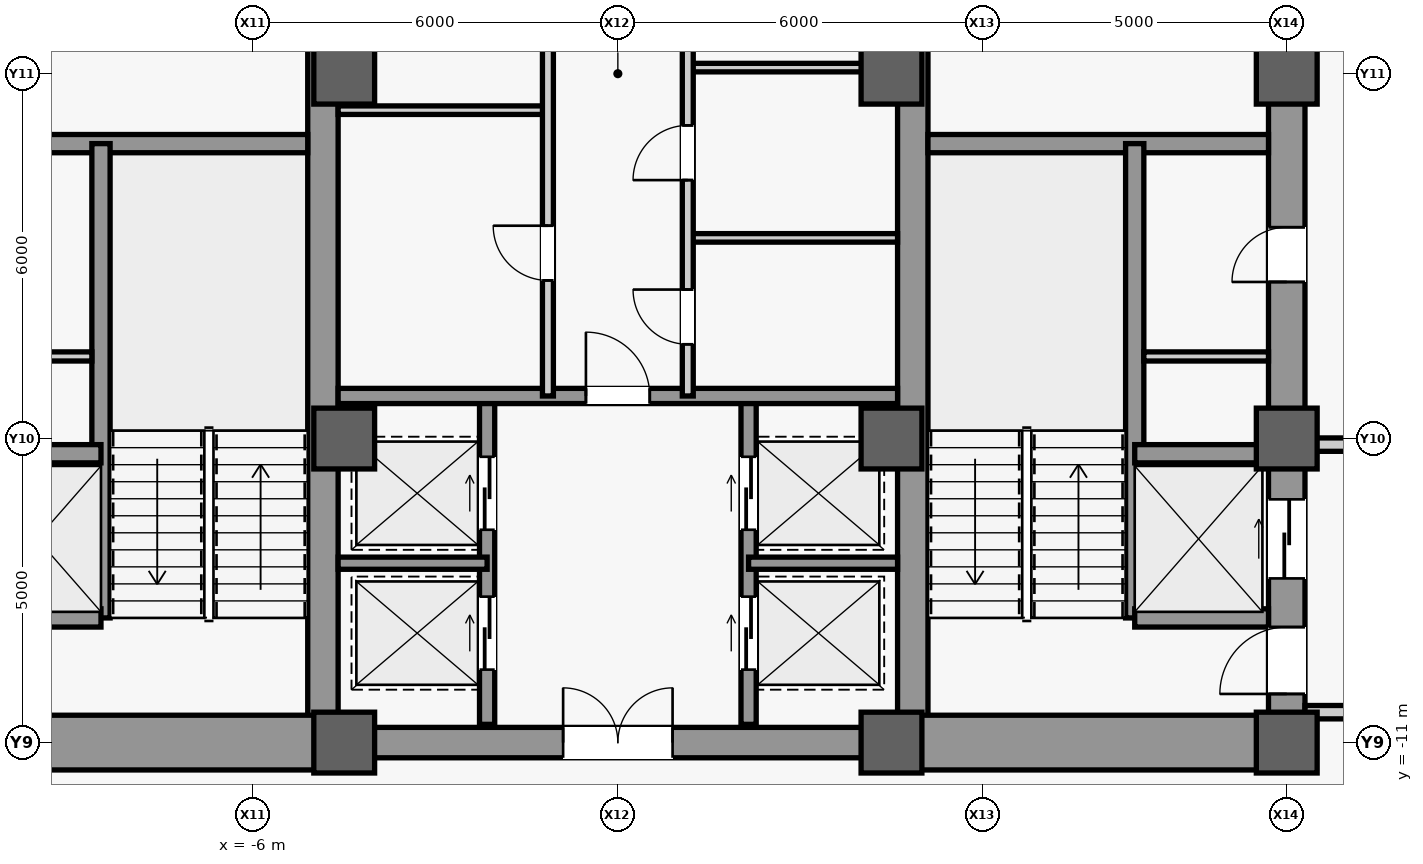
"""IFC4 building model, lengths in metres.
Left out: names, types, materials, properties, quantities, classifications, styles, units other than length and angle.
Written with IfcOpenShell. Run it as: python <this file> out.ifc"""

import sys

from ifc_helpers import new_model, si_unit, direction, frame, frame_2d, origin, origin_2d, place, context, subcontext, project, spatial, rectangle, extrude, source, transform, mapped, element, fill, save


model = new_model("IFC4")
c1 = context("Model", 3, precision=1e-05, world=origin(), true_north=direction((0.0, 1.0)))
c2 = subcontext(c1, "Body", "Model", "MODEL_VIEW")
j1 = project(units=[si_unit("LENGTHUNIT", "METRE"), si_unit("PLANEANGLEUNIT", "RADIAN")], contexts=[c1])
p1 = place(None, origin())
s1 = spatial("IfcSite", under=j1, at=p1, CompositionType="ELEMENT")
p2 = place(p1, origin())
s2 = spatial("IfcBuilding", under=s1, at=p2, CompositionType="ELEMENT")
p3 = place(p2, frame((0.0, 0.0, 70.4)))
s3 = spatial("IfcBuildingStorey", under=s2, at=p3, CompositionType="ELEMENT", Elevation=70.4)
m1 = source(origin(), c2, "Body", "SweptSolid", [
    extrude(rectangle(XDim=22.0, YDim=0.6, at=frame_2d((11.0, 0.0))), origin(), (0.0, 0.0, 1.0), 3.94),
])
p4 = place(p3, frame((11.0, -11.0, 0.0), z_axis=(0.0, 0.0, 1.0), x_axis=(0.0, 1.0, 0.0)))
e1 = element("IfcWall", 1, at=p4, inside=s3, PredefinedType="SHEAR", context=c2, shape_type="MappedRepresentation", body=[
    mapped(m1, transform((0.0, 0.0, 0.0), scale=1.0)),
])
m2 = source(origin(), c2, "Body", "SweptSolid", [
    extrude(rectangle(XDim=1.1, YDim=2.2, at=frame_2d((0.55, 1.1))), frame((0.0, 0.31, 0.0), z_axis=(0.0, -1.0, 0.0), x_axis=(1.0, 0.0, 0.0)), (0.0, 0.0, 1.0), 0.62),
])
p5 = place(p4, frame((0.8, 0.0, 0.0)))
e2 = element("IfcOpeningElement", 2, at=p5, cuts=e1, PredefinedType="OPENING", context=c2, shape_type="MappedRepresentation", body=[
    mapped(m2, transform((0.0, 0.0, 0.0), scale=1.0)),
])
m3 = source(origin(), c2, "Body", "SweptSolid", [
    extrude(rectangle(XDim=0.9, YDim=2.15, at=frame_2d((0.45, 1.075))), frame((0.0, 0.31, 0.0), z_axis=(0.0, -1.0, 0.0), x_axis=(1.0, 0.0, 0.0)), (0.0, 0.0, 1.0), 0.62),
])
p6 = place(p4, frame((7.575, 0.0, 0.0)))
e3 = element("IfcOpeningElement", 3, at=p6, cuts=e1, PredefinedType="OPENING", context=c2, shape_type="MappedRepresentation", body=[
    mapped(m3, transform((0.0, 0.0, 0.0), scale=1.0)),
])
m4 = source(origin(), c2, "Body", "SweptSolid", [
    extrude(rectangle(XDim=1.3, YDim=2.3, at=frame_2d((0.65, 1.15))), frame((0.0, 0.31, 0.0), z_axis=(0.0, -1.0, 0.0), x_axis=(1.0, 0.0, 0.0)), (0.0, 0.0, 1.0), 0.62),
])
p7 = place(p4, frame((2.7, 0.0, 0.0)))
e4 = element("IfcOpeningElement", 4, at=p7, cuts=e1, PredefinedType="OPENING", context=c2, shape_type="MappedRepresentation", body=[
    mapped(m4, transform((0.0, 0.0, 0.0), scale=1.0)),
])
p8 = place(p4, frame((13.35, 0.0, 0.0)))
e5 = element("IfcOpeningElement", 5, at=p8, cuts=e1, PredefinedType="OPENING", context=c2, shape_type="MappedRepresentation", body=[
    mapped(m4, transform((0.0, 0.0, 0.0), scale=1.0)),
])
m5 = source(origin(), c2, "Body", "SweptSolid", [
    extrude(rectangle(XDim=21.4, YDim=0.5, at=frame_2d((10.7, 0.0))), origin(), (0.0, 0.0, 1.0), 3.94),
])
for number, where, z_axis, x_axis in (
    (6, (-4.85, -10.7, 0.0), (0.0, 0.0, 1.0), (0.0, 1.0, 0.0)),
    (7, (4.85, -10.7, 0.0), (0.0, 0.0, 1.0), (0.0, 1.0, 0.0)),
):
    element("IfcWall", number, at=place(p3, frame(where, z_axis=z_axis, x_axis=x_axis)), inside=s3, PredefinedType="SHEAR", context=c2, shape_type="MappedRepresentation", body=[
        mapped(m5, transform((0.0, 0.0, 0.0), scale=1.0)),
    ])
m6 = source(origin(), c2, "Body", "SweptSolid", [
    extrude(rectangle(XDim=5.85, YDim=0.9, at=frame_2d((2.925, 0.0))), origin(), (0.0, 0.0, 1.0), 3.94),
])
for number, where, z_axis, x_axis in (
    (8, (-10.7, -11.0, 0.0), (0.0, 0.0, 1.0), (1.0, 0.0, 0.0)),
    (9, (4.85, -11.0, 0.0), (0.0, 0.0, 1.0), (1.0, 0.0, 0.0)),
):
    element("IfcWall", number, at=place(p3, frame(where, z_axis=z_axis, x_axis=x_axis)), inside=s3, PredefinedType="SHEAR", context=c2, shape_type="MappedRepresentation", body=[
        mapped(m6, transform((0.0, 0.0, 0.0), scale=1.0)),
    ])
m7 = source(origin(), c2, "Body", "SweptSolid", [
    extrude(rectangle(XDim=5.6, YDim=0.3, at=frame_2d((2.8, 0.0))), origin(), (0.0, 0.0, 1.0), 3.94),
])
for number, where, z_axis, x_axis in (
    (10, (-10.7, -1.15, 0.0), (0.0, 0.0, 1.0), (1.0, 0.0, 0.0)),
    (11, (5.1, -1.15, 0.0), (0.0, 0.0, 1.0), (1.0, 0.0, 0.0)),
):
    element("IfcWall", number, at=place(p3, frame(where, z_axis=z_axis, x_axis=x_axis)), inside=s3, PredefinedType="SHEAR", context=c2, shape_type="MappedRepresentation", body=[
        mapped(m7, transform((0.0, 0.0, 0.0), scale=1.0)),
    ])
m8 = source(origin(), c2, "Body", "SweptSolid", [
    extrude(rectangle(XDim=9.2, YDim=0.5, at=frame_2d((4.6, 0.0))), origin(), (0.0, 0.0, 1.0), 3.94),
])
p9 = place(p3, frame((-4.6, -11.0, 0.0), z_axis=(0.0, 0.0, 1.0), x_axis=(1.0, 0.0, 0.0)))
e12 = element("IfcWall", 12, at=p9, inside=s3, PredefinedType="SHEAR", context=c2, shape_type="MappedRepresentation", body=[
    mapped(m8, transform((0.0, 0.0, 0.0), scale=1.0)),
])
m9 = source(origin(), c2, "Body", "SweptSolid", [
    extrude(rectangle(XDim=1.8, YDim=2.25, at=frame_2d((0.9, 1.125))), frame((0.0, 0.26, 0.0), z_axis=(0.0, -1.0, 0.0), x_axis=(1.0, 0.0, 0.0)), (0.0, 0.0, 1.0), 0.52),
])
p10 = place(p9, frame((3.7, 0.0, 0.0)))
e13 = element("IfcOpeningElement", 13, at=p10, cuts=e12, PredefinedType="OPENING", context=c2, shape_type="MappedRepresentation", body=[
    mapped(m9, transform((0.0, 0.0, 0.0), scale=1.0)),
])
m10 = source(origin(), c2, "Body", "SweptSolid", [
    extrude(rectangle(XDim=1.0, YDim=1.0, at=origin_2d()), origin(), (0.0, 0.0, 1.0), 4.2),
])
for number, where, z_axis, x_axis in (
    (14, (-4.5, -11.0, 0.0), (0.0, 0.0, 1.0), (1.0, 0.0, 0.0)),
    (15, (-4.5, -6.0, 0.0), (0.0, 0.0, 1.0), (1.0, 0.0, 0.0)),
    (16, (-4.5, 0.0, 0.0), (0.0, 0.0, 1.0), (1.0, 0.0, 0.0)),
    (17, (4.5, -11.0, 0.0), (0.0, 0.0, 1.0), (1.0, 0.0, 0.0)),
    (18, (4.5, -6.0, 0.0), (0.0, 0.0, 1.0), (1.0, 0.0, 0.0)),
    (19, (4.5, 0.0, 0.0), (0.0, 0.0, 1.0), (1.0, 0.0, 0.0)),
    (20, (11.0, -11.0, 0.0), (0.0, 0.0, 1.0), (1.0, 0.0, 0.0)),
    (21, (11.0, -6.0, 0.0), (0.0, 0.0, 1.0), (1.0, 0.0, 0.0)),
    (22, (11.0, 0.0, 0.0), (0.0, 0.0, 1.0), (1.0, 0.0, 0.0)),
):
    element("IfcColumn", number, at=place(p3, frame(where, z_axis=z_axis, x_axis=x_axis)), inside=s3, PredefinedType="COLUMN", context=c2, shape_type="MappedRepresentation", body=[
        mapped(m10, transform((0.0, 0.0, 0.0), scale=1.0)),
    ])
m11 = source(origin(), c2, "Body", "SweptSolid", [
    extrude(rectangle(XDim=7.8, YDim=0.3, at=frame_2d((3.9, 0.0))), origin(), (0.0, 0.0, 1.0), 3.94),
])
p11 = place(p3, frame((-8.5, -8.95, 0.0), z_axis=(0.0, 0.0, 1.0), x_axis=(0.0, 1.0, 0.0)))
e23 = element("IfcWall", 23, at=p11, inside=s3, PredefinedType="SHEAR", context=c2, shape_type="MappedRepresentation", body=[
    mapped(m11, transform((0.0, 0.0, 0.0), scale=1.0)),
])
m12 = source(origin(), c2, "Body", "SweptSolid", [
    extrude(rectangle(XDim=2.2, YDim=0.3, at=frame_2d((1.1, 0.0))), origin(), (0.0, 0.0, 1.0), 3.94),
])
for number, where, z_axis, x_axis in (
    (24, (-10.7, -8.95, 0.0), (0.0, 0.0, 1.0), (1.0, 0.0, 0.0)),
    (25, (-10.7, -6.25, 0.0), (0.0, 0.0, 1.0), (1.0, 0.0, 0.0)),
):
    element("IfcWall", number, at=place(p3, frame(where, z_axis=z_axis, x_axis=x_axis)), inside=s3, PredefinedType="SHEAR", context=c2, shape_type="MappedRepresentation", body=[
        mapped(m12, transform((0.0, 0.0, 0.0), scale=1.0)),
    ])
p12 = place(p3, frame((8.5, -8.95, 0.0), z_axis=(0.0, 0.0, 1.0), x_axis=(0.0, 1.0, 0.0)))
e26 = element("IfcWall", 26, at=p12, inside=s3, PredefinedType="SHEAR", context=c2, shape_type="MappedRepresentation", body=[
    mapped(m11, transform((0.0, 0.0, 0.0), scale=1.0)),
])
for number, where, z_axis, x_axis in (
    (27, (8.5, -8.95, 0.0), (0.0, 0.0, 1.0), (1.0, 0.0, 0.0)),
    (28, (8.5, -6.25, 0.0), (0.0, 0.0, 1.0), (1.0, 0.0, 0.0)),
):
    element("IfcWall", number, at=place(p3, frame(where, z_axis=z_axis, x_axis=x_axis)), inside=s3, PredefinedType="SHEAR", context=c2, shape_type="MappedRepresentation", body=[
        mapped(m12, transform((0.0, 0.0, 0.0), scale=1.0)),
    ])
m13 = source(origin(), c2, "Body", "SweptSolid", [
    extrude(rectangle(XDim=2.05, YDim=0.15, at=frame_2d((1.025, 0.0))), origin(), (0.0, 0.0, 1.0), 3.94),
])
for number, where, z_axis, x_axis in (
    (29, (-10.7, -4.65, 0.0), (0.0, 0.0, 1.0), (1.0, 0.0, 0.0)),
    (30, (8.65, -4.65, 0.0), (0.0, 0.0, 1.0), (1.0, 0.0, 0.0)),
):
    element("IfcWall", number, at=place(p3, frame(where, z_axis=z_axis, x_axis=x_axis)), inside=s3, PredefinedType="PARTITIONING", context=c2, shape_type="MappedRepresentation", body=[
        mapped(m13, transform((0.0, 0.0, 0.0), scale=1.0)),
    ])
m14 = source(origin(), c2, "Body", "SweptSolid", [
    extrude(rectangle(XDim=4.05, YDim=0.22, at=frame_2d((2.025, 0.0))), origin(), (0.0, 0.0, 1.0), 3.94),
])
p13 = place(p3, frame((11.3, -10.5, 0.0), z_axis=(0.0, 0.0, 1.0), x_axis=(1.0, 0.0, 0.0)))
e31 = element("IfcWall", 31, at=p13, inside=s3, PredefinedType="PARTITIONING", context=c2, shape_type="MappedRepresentation", body=[
    mapped(m14, transform((0.0, 0.0, 0.0), scale=1.0)),
])
m15 = source(origin(), c2, "Body", "SweptSolid", [
    extrude(rectangle(XDim=4.05, YDim=0.22, at=frame_2d((2.025, 0.0))), origin(), (0.0, 0.0, 1.0), 3.085),
])
p14 = place(p3, frame((11.3, -6.1, 0.0), z_axis=(0.0, 0.0, 1.0), x_axis=(1.0, 0.0, 0.0)))
e32 = element("IfcWall", 32, at=p14, inside=s3, PredefinedType="PARTITIONING", context=c2, shape_type="MappedRepresentation", body=[
    mapped(m15, transform((0.0, 0.0, 0.0), scale=1.0)),
])
m16 = source(origin(), c2, "Body", "SweptSolid", [
    extrude(rectangle(XDim=5.4, YDim=0.25, at=frame_2d((2.7, 0.0))), origin(), (0.0, 0.0, 1.0), 3.94),
])
p15 = place(p3, frame((-2.15, -10.7, 0.0), z_axis=(0.0, 0.0, 1.0), x_axis=(0.0, 1.0, 0.0)))
e33 = element("IfcWall", 33, at=p15, inside=s3, PredefinedType="SHEAR", context=c2, shape_type="MappedRepresentation", body=[
    mapped(m16, transform((0.0, 0.0, 0.0), scale=1.0)),
])
m17 = source(origin(), c2, "Body", "SweptSolid", [
    extrude(rectangle(XDim=1.2, YDim=2.3, at=frame_2d((0.6, 1.15))), frame((0.0, 0.135, 0.0), z_axis=(0.0, -1.0, 0.0), x_axis=(1.0, 0.0, 0.0)), (0.0, 0.0, 1.0), 0.27),
])
p16 = place(p15, frame((0.9, 0.0, 0.0)))
e34 = element("IfcOpeningElement", 34, at=p16, cuts=e33, PredefinedType="OPENING", context=c2, shape_type="MappedRepresentation", body=[
    mapped(m17, transform((0.0, 0.0, 0.0), scale=1.0)),
])
p17 = place(p15, frame((3.2, 0.0, 0.0)))
e35 = element("IfcOpeningElement", 35, at=p17, cuts=e33, PredefinedType="OPENING", context=c2, shape_type="MappedRepresentation", body=[
    mapped(m17, transform((0.0, 0.0, 0.0), scale=1.0)),
])
p18 = place(p3, frame((2.15, -10.7, 0.0), z_axis=(0.0, 0.0, 1.0), x_axis=(0.0, 1.0, 0.0)))
e36 = element("IfcWall", 36, at=p18, inside=s3, PredefinedType="SHEAR", context=c2, shape_type="MappedRepresentation", body=[
    mapped(m16, transform((0.0, 0.0, 0.0), scale=1.0)),
])
p19 = place(p18, frame((0.9, 0.0, 0.0)))
e37 = element("IfcOpeningElement", 37, at=p19, cuts=e36, PredefinedType="OPENING", context=c2, shape_type="MappedRepresentation", body=[
    mapped(m17, transform((0.0, 0.0, 0.0), scale=1.0)),
])
p20 = place(p18, frame((3.2, 0.0, 0.0)))
e38 = element("IfcOpeningElement", 38, at=p20, cuts=e36, PredefinedType="OPENING", context=c2, shape_type="MappedRepresentation", body=[
    mapped(m17, transform((0.0, 0.0, 0.0), scale=1.0)),
])
m18 = source(origin(), c2, "Body", "SweptSolid", [
    extrude(rectangle(XDim=2.45, YDim=0.2, at=frame_2d((1.225, 0.0))), origin(), (0.0, 0.0, 1.0), 3.94),
])
for number, where, z_axis, x_axis in (
    (39, (-4.6, -8.05, 0.0), (0.0, 0.0, 1.0), (1.0, 0.0, 0.0)),
    (40, (2.15, -8.05, 0.0), (0.0, 0.0, 1.0), (1.0, 0.0, 0.0)),
):
    element("IfcWall", number, at=place(p3, frame(where, z_axis=z_axis, x_axis=x_axis)), inside=s3, PredefinedType="SHEAR", context=c2, shape_type="MappedRepresentation", body=[
        mapped(m18, transform((0.0, 0.0, 0.0), scale=1.0)),
    ])
m19 = source(origin(), c2, "Body", "SweptSolid", [
    extrude(rectangle(XDim=9.2, YDim=0.25, at=frame_2d((4.6, 0.0))), origin(), (0.0, 0.0, 1.0), 3.94),
])
p21 = place(p3, frame((-4.6, -5.3, 0.0), z_axis=(0.0, 0.0, 1.0), x_axis=(1.0, 0.0, 0.0)))
e41 = element("IfcWall", 41, at=p21, inside=s3, PredefinedType="SHEAR", context=c2, shape_type="MappedRepresentation", body=[
    mapped(m19, transform((0.0, 0.0, 0.0), scale=1.0)),
])
m20 = source(origin(), c2, "Body", "SweptSolid", [
    extrude(rectangle(XDim=1.05, YDim=2.2, at=frame_2d((0.525, 1.1))), frame((0.0, 0.135, 0.0), z_axis=(0.0, -1.0, 0.0), x_axis=(1.0, 0.0, 0.0)), (0.0, 0.0, 1.0), 0.27),
])
p22 = place(p21, frame((4.075, 0.0, 0.0)))
e42 = element("IfcOpeningElement", 42, at=p22, cuts=e41, PredefinedType="OPENING", context=c2, shape_type="MappedRepresentation", body=[
    mapped(m20, transform((0.0, 0.0, 0.0), scale=1.0)),
])
m21 = source(origin(), c2, "Body", "SweptSolid", [
    extrude(rectangle(XDim=3.45, YDim=0.14, at=frame_2d((1.725, 0.0))), origin(), (0.0, 0.0, 1.0), 3.94),
])
p23 = place(p3, frame((-4.6, -0.6, 0.0), z_axis=(0.0, 0.0, 1.0), x_axis=(1.0, 0.0, 0.0)))
e43 = element("IfcWall", 43, at=p23, inside=s3, PredefinedType="PARTITIONING", context=c2, shape_type="MappedRepresentation", body=[
    mapped(m21, transform((0.0, 0.0, 0.0), scale=1.0)),
])
m22 = source(origin(), c2, "Body", "SweptSolid", [
    extrude(rectangle(XDim=10.6, YDim=0.18, at=frame_2d((5.3, 0.0))), origin(), (0.0, 0.0, 1.0), 3.94),
])
p24 = place(p3, frame((-1.15, -5.3, 0.0), z_axis=(0.0, 0.0, 1.0), x_axis=(0.0, 1.0, 0.0)))
e44 = element("IfcWall", 44, at=p24, inside=s3, PredefinedType="PARTITIONING", context=c2, shape_type="MappedRepresentation", body=[
    mapped(m22, transform((0.0, 0.0, 0.0), scale=1.0)),
])
m23 = source(origin(), c2, "Body", "SweptSolid", [
    extrude(rectangle(XDim=0.9, YDim=2.15, at=frame_2d((0.45, 1.075))), frame((0.0, 0.1, 0.0), z_axis=(0.0, -1.0, 0.0), x_axis=(1.0, 0.0, 0.0)), (0.0, 0.0, 1.0), 0.2),
])
p25 = place(p24, frame((1.9, 0.0, 0.0)))
e45 = element("IfcOpeningElement", 45, at=p25, cuts=e44, PredefinedType="OPENING", context=c2, shape_type="MappedRepresentation", body=[
    mapped(m23, transform((0.0, 0.0, 0.0), scale=1.0)),
])
p26 = place(p24, frame((6.55, 0.0, 0.0)))
e46 = element("IfcOpeningElement", 46, at=p26, cuts=e44, PredefinedType="OPENING", context=c2, shape_type="MappedRepresentation", body=[
    mapped(m23, transform((0.0, 0.0, 0.0), scale=1.0)),
])
p27 = place(p24, frame((9.475, 0.0, 0.0)))
e47 = element("IfcOpeningElement", 47, at=p27, cuts=e44, PredefinedType="OPENING", context=c2, shape_type="MappedRepresentation", body=[
    mapped(m23, transform((0.0, 0.0, 0.0), scale=1.0)),
])
p28 = place(p3, frame((1.15, -2.7, 0.0), z_axis=(0.0, 0.0, 1.0), x_axis=(1.0, 0.0, 0.0)))
e48 = element("IfcWall", 48, at=p28, inside=s3, PredefinedType="PARTITIONING", context=c2, shape_type="MappedRepresentation", body=[
    mapped(m21, transform((0.0, 0.0, 0.0), scale=1.0)),
])
m24 = source(origin(), c2, "Body", "SweptSolid", [
    extrude(rectangle(XDim=3.45, YDim=0.14, at=frame_2d((1.725, 0.0))), origin(), (0.0, 0.0, 1.0), 3.245),
])
p29 = place(p3, frame((1.15, 0.1, 0.0), z_axis=(0.0, 0.0, 1.0), x_axis=(1.0, 0.0, 0.0)))
e49 = element("IfcWall", 49, at=p29, inside=s3, PredefinedType="PARTITIONING", context=c2, shape_type="MappedRepresentation", body=[
    mapped(m24, transform((0.0, 0.0, 0.0), scale=1.0)),
])
p30 = place(p3, frame((1.15, -5.3, 0.0), z_axis=(0.0, 0.0, 1.0), x_axis=(0.0, 1.0, 0.0)))
e50 = element("IfcWall", 50, at=p30, inside=s3, PredefinedType="PARTITIONING", context=c2, shape_type="MappedRepresentation", body=[
    mapped(m22, transform((0.0, 0.0, 0.0), scale=1.0)),
])
p31 = place(p30, frame((0.85, 0.0, 0.0)))
e51 = element("IfcOpeningElement", 51, at=p31, cuts=e50, PredefinedType="OPENING", context=c2, shape_type="MappedRepresentation", body=[
    mapped(m23, transform((0.0, 0.0, 0.0), scale=1.0)),
])
p32 = place(p30, frame((3.55, 0.0, 0.0)))
e52 = element("IfcOpeningElement", 52, at=p32, cuts=e50, PredefinedType="OPENING", context=c2, shape_type="MappedRepresentation", body=[
    mapped(m23, transform((0.0, 0.0, 0.0), scale=1.0)),
])
p33 = place(p30, frame((6.3, 0.0, 0.0)))
e53 = element("IfcOpeningElement", 53, at=p33, cuts=e50, PredefinedType="OPENING", context=c2, shape_type="MappedRepresentation", body=[
    mapped(m23, transform((0.0, 0.0, 0.0), scale=1.0)),
])
p34 = place(p30, frame((8.25, 0.0, 0.0)))
e54 = element("IfcOpeningElement", 54, at=p34, cuts=e50, PredefinedType="OPENING", context=c2, shape_type="MappedRepresentation", body=[
    mapped(m23, transform((0.0, 0.0, 0.0), scale=1.0)),
])
p35 = place(p30, frame((9.475, 0.0, 0.0)))
e55 = element("IfcOpeningElement", 55, at=p35, cuts=e50, PredefinedType="OPENING", context=c2, shape_type="MappedRepresentation", body=[
    mapped(m23, transform((0.0, 0.0, 0.0), scale=1.0)),
])
m25 = source(origin(), c2, "Body", "SweptSolid", [
    extrude(rectangle(XDim=1.1, YDim=2.2, at=frame_2d((0.55, 1.1))), frame((0.0, 0.025, 0.0), z_axis=(0.0, -1.0, 0.0), x_axis=(1.0, 0.0, 0.0)), (0.0, 0.0, 1.0), 0.05),
])
p36 = place(p5, origin())
e56 = element("IfcDoor", 56, at=p36, inside=s3, OperationType="SINGLE_SWING_LEFT", PredefinedType="DOOR", context=c2, shape_type="MappedRepresentation", body=[
    mapped(m25, transform((0.0, 0.0, 0.0), scale=1.0)),
])
fill(e2, e56)
m26 = source(origin(), c2, "Body", "SweptSolid", [
    extrude(rectangle(XDim=0.9, YDim=2.15, at=frame_2d((0.45, 1.075))), frame((0.0, 0.025, 0.0), z_axis=(0.0, -1.0, 0.0), x_axis=(1.0, 0.0, 0.0)), (0.0, 0.0, 1.0), 0.05),
])
p37 = place(p6, origin())
e57 = element("IfcDoor", 57, at=p37, inside=s3, OperationType="SINGLE_SWING_LEFT", PredefinedType="DOOR", context=c2, shape_type="MappedRepresentation", body=[
    mapped(m26, transform((0.0, 0.0, 0.0), scale=1.0)),
])
fill(e3, e57)
m27 = source(origin(), c2, "Body", "SweptSolid", [
    extrude(rectangle(XDim=1.05, YDim=2.2, at=frame_2d((0.525, 1.1))), frame((0.0, 0.025, 0.0), z_axis=(0.0, -1.0, 0.0), x_axis=(1.0, 0.0, 0.0)), (0.0, 0.0, 1.0), 0.05),
])
p38 = place(p22, origin())
e58 = element("IfcDoor", 58, at=p38, inside=s3, OperationType="SINGLE_SWING_LEFT", PredefinedType="DOOR", context=c2, shape_type="MappedRepresentation", body=[
    mapped(m27, transform((0.0, 0.0, 0.0), scale=1.0)),
])
fill(e42, e58)
m28 = source(origin(), c2, "Body", "SweptSolid", [
    extrude(rectangle(XDim=1.8, YDim=2.25, at=frame_2d((0.9, 1.125))), frame((0.0, 0.025, 0.0), z_axis=(0.0, -1.0, 0.0), x_axis=(1.0, 0.0, 0.0)), (0.0, 0.0, 1.0), 0.05),
])
p39 = place(p10, origin())
e59 = element("IfcDoor", 59, at=p39, inside=s3, OperationType="SINGLE_SWING_LEFT", PredefinedType="DOOR", context=c2, shape_type="MappedRepresentation", body=[
    mapped(m28, transform((0.0, 0.0, 0.0), scale=1.0)),
])
fill(e13, e59)
p40 = place(p25, origin())
e60 = element("IfcDoor", 60, at=p40, inside=s3, OperationType="SINGLE_SWING_RIGHT", PredefinedType="DOOR", context=c2, shape_type="MappedRepresentation", body=[
    mapped(m26, transform((0.0, 0.0, 0.0), scale=1.0)),
])
fill(e45, e60)
p41 = place(p31, origin())
e61 = element("IfcDoor", 61, at=p41, inside=s3, OperationType="SINGLE_SWING_RIGHT", PredefinedType="DOOR", context=c2, shape_type="MappedRepresentation", body=[
    mapped(m26, transform((0.0, 0.0, 0.0), scale=1.0)),
])
fill(e51, e61)
p42 = place(p32, origin())
e62 = element("IfcDoor", 62, at=p42, inside=s3, OperationType="SINGLE_SWING_LEFT", PredefinedType="DOOR", context=c2, shape_type="MappedRepresentation", body=[
    mapped(m26, transform((0.0, 0.0, 0.0), scale=1.0)),
])
fill(e52, e62)
m29 = source(origin(), c2, "Body", "SweptSolid", [
    extrude(rectangle(XDim=1.2, YDim=2.3, at=frame_2d((0.6, 1.15))), frame((0.0, 0.025, 0.0), z_axis=(0.0, -1.0, 0.0), x_axis=(1.0, 0.0, 0.0)), (0.0, 0.0, 1.0), 0.05),
])
p43 = place(p16, origin())
e63 = element("IfcDoor", 63, at=p43, inside=s3, OperationType="SLIDING_TO_LEFT", PredefinedType="DOOR", context=c2, shape_type="MappedRepresentation", body=[
    mapped(m29, transform((0.0, 0.0, 0.0), scale=1.0)),
])
fill(e34, e63)
p44 = place(p19, origin())
e64 = element("IfcDoor", 64, at=p44, inside=s3, OperationType="SLIDING_TO_LEFT", PredefinedType="DOOR", context=c2, shape_type="MappedRepresentation", body=[
    mapped(m29, transform((0.0, 0.0, 0.0), scale=1.0)),
])
fill(e37, e64)
p45 = place(p17, origin())
e65 = element("IfcDoor", 65, at=p45, inside=s3, OperationType="SLIDING_TO_LEFT", PredefinedType="DOOR", context=c2, shape_type="MappedRepresentation", body=[
    mapped(m29, transform((0.0, 0.0, 0.0), scale=1.0)),
])
fill(e35, e65)
p46 = place(p20, origin())
e66 = element("IfcDoor", 66, at=p46, inside=s3, OperationType="SLIDING_TO_LEFT", PredefinedType="DOOR", context=c2, shape_type="MappedRepresentation", body=[
    mapped(m29, transform((0.0, 0.0, 0.0), scale=1.0)),
])
fill(e38, e66)
m30 = source(origin(), c2, "Body", "SweptSolid", [
    extrude(rectangle(XDim=1.3, YDim=2.3, at=frame_2d((0.65, 1.15))), frame((0.0, 0.025, 0.0), z_axis=(0.0, -1.0, 0.0), x_axis=(1.0, 0.0, 0.0)), (0.0, 0.0, 1.0), 0.05),
])
p47 = place(p7, origin())
e67 = element("IfcDoor", 67, at=p47, inside=s3, OperationType="SLIDING_TO_LEFT", PredefinedType="DOOR", context=c2, shape_type="MappedRepresentation", body=[
    mapped(m30, transform((0.0, 0.0, 0.0), scale=1.0)),
])
fill(e4, e67)
save(model, sys.argv[1])
